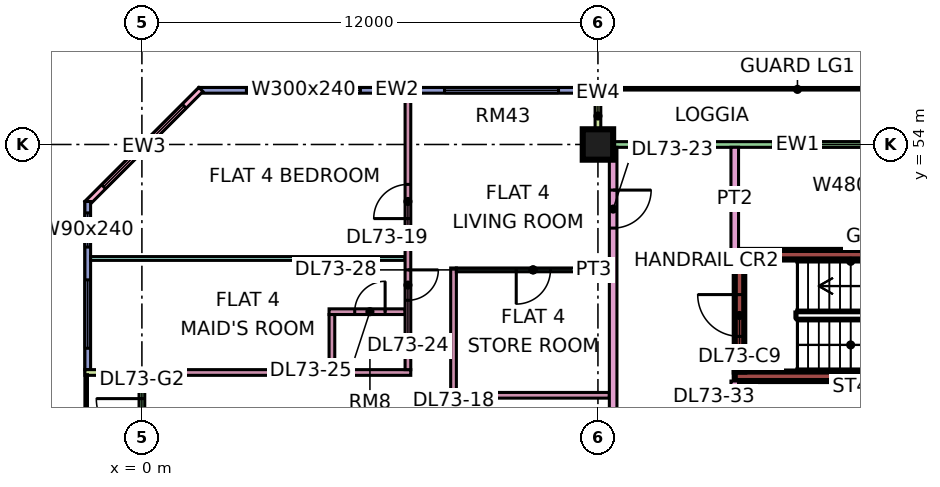
"""IFC4 building model, lengths in metres.
Left out: names, types, materials, properties, quantities, classifications, styles, units other than length and angle.
Written with IfcOpenShell. Run it as: python <this file> out.ifc"""

import sys

from ifc_helpers import new_model, si_unit, direction, frame, frame_2d, origin, origin_2d, place, context, subcontext, project, spatial, rectangle, extrude, element, fill, save


model = new_model("IFC4")
c1 = context("Model", 3, precision=1e-05, world=origin(), true_north=direction((0.0, 1.0)))
c2 = subcontext(c1, "Body", "Model", "MODEL_VIEW")
j1 = project(units=[si_unit("LENGTHUNIT", "METRE"), si_unit("PLANEANGLEUNIT", "RADIAN")], contexts=[c1])
p1 = place(None, origin())
s1 = spatial("IfcSite", under=j1, at=p1, CompositionType="ELEMENT")
p2 = place(p1, origin())
s2 = spatial("IfcBuilding", under=s1, at=p2, CompositionType="ELEMENT")
p3 = place(p2, frame((0.0, 0.0, 310.9)))
s3 = spatial("IfcBuildingStorey", under=s2, at=p3, CompositionType="ELEMENT", Elevation=310.9)
p4 = place(p3, frame((12.0, 54.0, 0.0), z_axis=(0.0, 0.0, 1.0), x_axis=(1.0, 0.0, 0.0)))
e1 = element("IfcColumn", 1, at=p4, inside=s3, PredefinedType="COLUMN", context=c2, shape_type="SweptSolid", body=[
    extrude(rectangle(XDim=0.8, YDim=0.8, at=origin_2d()), origin(), (0.0, 0.0, 1.0), 3.75),
])
for number, where, z_axis, x_axis in (
    (2, (15.6, 47.9, 0.0), (0.0, 0.0, 1.0), (1.0, 0.0, 0.0)),
    (3, (15.6, 51.1, 0.0), (0.0, 0.0, 1.0), (1.0, 0.0, 0.0)),
):
    element("IfcWall", number, at=place(p3, frame(where, z_axis=z_axis, x_axis=x_axis)), inside=s3, PredefinedType="SHEAR", context=c2, shape_type="SweptSolid", body=[
        extrude(rectangle(XDim=7.0, YDim=0.25, at=frame_2d((3.5, 0.0))), origin(), (0.0, 0.0, 1.0), 3.75),
    ])
p5 = place(p3, frame((15.725, 48.025, 0.0), z_axis=(0.0, 0.0, 1.0), x_axis=(0.0, 1.0, 0.0)))
e4 = element("IfcWall", 4, at=p5, inside=s3, PredefinedType="SHEAR", context=c2, shape_type="SweptSolid", body=[
    extrude(rectangle(XDim=2.95, YDim=0.25, at=frame_2d((1.475, 0.0))), origin(), (0.0, 0.0, 1.0), 3.75),
])
p6 = place(p5, frame((0.925, 0.0, 0.0)))
e5 = element("IfcOpeningElement", 5, at=p6, cuts=e4, PredefinedType="OPENING", context=c2, shape_type="SweptSolid", body=[
    extrude(rectangle(XDim=1.1, YDim=2.2, at=frame_2d((0.55, 1.1))), frame((0.0, 0.135, 0.0), z_axis=(0.0, -1.0, 0.0), x_axis=(1.0, 0.0, 0.0)), (0.0, 0.0, 1.0), 0.27),
])
p7 = place(p3, frame((22.425, 54.0, 0.0), z_axis=(0.0, 0.0, 1.0), x_axis=(-1.0, 0.0, 0.0)))
e6 = element("IfcWall", 6, at=p7, inside=s3, PredefinedType="SOLIDWALL", context=c2, shape_type="SweptSolid", body=[
    extrude(rectangle(XDim=10.35, YDim=0.15, at=frame_2d((5.175, 0.0))), origin(), (0.0, 0.0, 1.0), 3.35),
])
p8 = place(p7, frame((1.012, 0.0, 0.45)))
e7 = element("IfcOpeningElement", 7, at=p8, cuts=e6, PredefinedType="OPENING", context=c2, shape_type="SweptSolid", body=[
    extrude(rectangle(XDim=4.8, YDim=2.4, at=frame_2d((2.4, 1.2))), frame((0.0, 0.085, 0.0), z_axis=(0.0, -1.0, 0.0), x_axis=(1.0, 0.0, 0.0)), (0.0, 0.0, 1.0), 0.17),
])
p9 = place(p3, frame((12.0, 55.5, 0.0), z_axis=(0.0, 0.0, 1.0), x_axis=(0.0, -1.0, 0.0)))
e8 = element("IfcWall", 8, at=p9, inside=s3, PredefinedType="SOLIDWALL", context=c2, shape_type="SweptSolid", body=[
    extrude(rectangle(XDim=1.5, YDim=0.15, at=frame_2d((0.75, 0.0))), origin(), (0.0, 0.0, 1.0), 3.35),
])
p10 = place(p3, frame((11.925, 55.425, 0.0), z_axis=(0.0, 0.0, 1.0), x_axis=(-1.0, 0.0, 0.0)))
e9 = element("IfcWall", 9, at=p10, inside=s3, PredefinedType="SOLIDWALL", context=c2, shape_type="SweptSolid", body=[
    extrude(rectangle(XDim=10.425, YDim=0.15, at=frame_2d((5.212, 0.0))), origin(), (0.0, 0.0, 1.0), 3.35),
])
p11 = place(p10, frame((0.962, 0.0, 0.45)))
e10 = element("IfcOpeningElement", 10, at=p11, cuts=e9, PredefinedType="OPENING", context=c2, shape_type="SweptSolid", body=[
    extrude(rectangle(XDim=3.0, YDim=2.4, at=frame_2d((1.5, 1.2))), frame((0.0, 0.085, 0.0), z_axis=(0.0, -1.0, 0.0), x_axis=(1.0, 0.0, 0.0)), (0.0, 0.0, 1.0), 0.17),
])
p12 = place(p10, frame((6.175, 0.0, 0.45)))
e11 = element("IfcOpeningElement", 11, at=p12, cuts=e9, PredefinedType="OPENING", context=c2, shape_type="SweptSolid", body=[
    extrude(rectangle(XDim=3.0, YDim=2.4, at=frame_2d((1.5, 1.2))), frame((0.0, 0.085, 0.0), z_axis=(0.0, -1.0, 0.0), x_axis=(1.0, 0.0, 0.0)), (0.0, 0.0, 1.0), 0.17),
])
p13 = place(p3, frame((1.553, 55.447, 0.0), z_axis=(0.0, 0.0, 1.0), x_axis=(-0.707106781187, -0.707106781187, 0.0)))
e12 = element("IfcWall", 12, at=p13, inside=s3, PredefinedType="SOLIDWALL", context=c2, shape_type="SweptSolid", body=[
    extrude(rectangle(XDim=4.243, YDim=0.15, at=frame_2d((2.121, 0.0))), origin(), (0.0, 0.0, 1.0), 3.35),
])
p14 = place(p13, frame((0.621, 0.0, 0.45)))
e13 = element("IfcOpeningElement", 13, at=p14, cuts=e12, PredefinedType="OPENING", context=c2, shape_type="SweptSolid", body=[
    extrude(rectangle(XDim=3.0, YDim=2.4, at=frame_2d((1.5, 1.2))), frame((0.0, 0.085, 0.0), z_axis=(0.0, -1.0, 0.0), x_axis=(1.0, 0.0, 0.0)), (0.0, 0.0, 1.0), 0.17),
])
p15 = place(p3, frame((-1.425, 52.5, 0.0), z_axis=(0.0, 0.0, 1.0), x_axis=(0.0, -1.0, 0.0)))
e14 = element("IfcWall", 14, at=p15, inside=s3, PredefinedType="SOLIDWALL", context=c2, shape_type="SweptSolid", body=[
    extrude(rectangle(XDim=4.425, YDim=0.15, at=frame_2d((2.212, 0.0))), origin(), (0.0, 0.0, 1.0), 3.35),
])
p16 = place(p15, frame((0.3, 0.0, 0.45)))
e15 = element("IfcOpeningElement", 15, at=p16, cuts=e14, PredefinedType="OPENING", context=c2, shape_type="SweptSolid", body=[
    extrude(rectangle(XDim=0.9, YDim=2.4, at=frame_2d((0.45, 1.2))), frame((0.0, 0.085, 0.0), z_axis=(0.0, -1.0, 0.0), x_axis=(1.0, 0.0, 0.0)), (0.0, 0.0, 1.0), 0.17),
])
p17 = place(p15, frame((2.062, 0.0, 0.45)))
e16 = element("IfcOpeningElement", 16, at=p17, cuts=e14, PredefinedType="OPENING", context=c2, shape_type="SweptSolid", body=[
    extrude(rectangle(XDim=1.8, YDim=2.4, at=frame_2d((0.9, 1.2))), frame((0.0, 0.085, 0.0), z_axis=(0.0, -1.0, 0.0), x_axis=(1.0, 0.0, 0.0)), (0.0, 0.0, 1.0), 0.17),
])
p18 = place(p3, frame((0.0, 47.925, 0.0), z_axis=(0.0, 0.0, 1.0), x_axis=(0.0, -1.0, 0.0)))
e17 = element("IfcWall", 17, at=p18, inside=s3, PredefinedType="SOLIDWALL", context=c2, shape_type="SweptSolid", body=[
    extrude(rectangle(XDim=11.85, YDim=0.15, at=frame_2d((5.925, 0.0))), origin(), (0.0, 0.0, 1.0), 3.35),
])
p19 = place(p18, frame((0.613, 0.0, 0.0)))
e18 = element("IfcOpeningElement", 18, at=p19, cuts=e17, PredefinedType="OPENING", context=c2, shape_type="SweptSolid", body=[
    extrude(rectangle(XDim=1.2, YDim=2.4, at=frame_2d((0.6, 1.2))), frame((0.0, 0.085, 0.0), z_axis=(0.0, -1.0, 0.0), x_axis=(1.0, 0.0, 0.0)), (0.0, 0.0, 1.0), 0.17),
])
p20 = place(p18, frame((4.675, 0.0, 0.45)))
e19 = element("IfcOpeningElement", 19, at=p20, cuts=e17, PredefinedType="OPENING", context=c2, shape_type="SweptSolid", body=[
    extrude(rectangle(XDim=3.0, YDim=2.4, at=frame_2d((1.5, 1.2))), frame((0.0, 0.085, 0.0), z_axis=(0.0, -1.0, 0.0), x_axis=(1.0, 0.0, 0.0)), (0.0, 0.0, 1.0), 0.17),
])
p21 = place(p18, frame((9.275, 0.0, 0.45)))
e20 = element("IfcOpeningElement", 20, at=p21, cuts=e17, PredefinedType="OPENING", context=c2, shape_type="SweptSolid", body=[
    extrude(rectangle(XDim=1.8, YDim=2.4, at=frame_2d((0.9, 1.2))), frame((0.0, 0.085, 0.0), z_axis=(0.0, -1.0, 0.0), x_axis=(1.0, 0.0, 0.0)), (0.0, 0.0, 1.0), 0.17),
])
p22 = place(p3, frame((-1.5, 48.0, 0.0), z_axis=(0.0, 0.0, 1.0), x_axis=(1.0, 0.0, 0.0)))
e21 = element("IfcWall", 21, at=p22, inside=s3, PredefinedType="SOLIDWALL", context=c2, shape_type="SweptSolid", body=[
    extrude(rectangle(XDim=1.5, YDim=0.15, at=frame_2d((0.75, 0.0))), origin(), (0.0, 0.0, 1.0), 3.35),
])
p23 = place(p3, frame((-1.351, 51.0, 0.0), z_axis=(0.0, 0.0, 1.0), x_axis=(1.0, 0.0, 0.0)))
e22 = element("IfcWall", 22, at=p23, inside=s3, PredefinedType="PARTITIONING", context=c2, shape_type="SweptSolid", body=[
    extrude(rectangle(XDim=8.276, YDim=0.1, at=frame_2d((4.138, 0.0))), origin(), (0.0, 0.0, 1.0), 3.35),
])
p24 = place(p3, frame((0.0, 48.0, 0.0), z_axis=(0.0, 0.0, 1.0), x_axis=(1.0, 0.0, 0.0)))
e23 = element("IfcWall", 23, at=p24, inside=s3, PredefinedType="PARTITIONING", context=c2, shape_type="SweptSolid", body=[
    extrude(rectangle(XDim=7.075, YDim=0.15, at=frame_2d((3.538, 0.0))), origin(), (0.0, 0.0, 1.0), 3.35),
])
p25 = place(p3, frame((4.925, 49.6, 0.0), z_axis=(0.0, 0.0, 1.0), x_axis=(1.0, 0.0, 0.0)))
e24 = element("IfcWall", 24, at=p25, inside=s3, PredefinedType="PARTITIONING", context=c2, shape_type="SweptSolid", body=[
    extrude(rectangle(XDim=2.0, YDim=0.15, at=frame_2d((1.0, 0.0))), origin(), (0.0, 0.0, 1.0), 3.35),
])
p26 = place(p25, frame((0.675, 0.0, 0.0)))
e25 = element("IfcOpeningElement", 25, at=p26, cuts=e24, PredefinedType="OPENING", context=c2, shape_type="SweptSolid", body=[
    extrude(rectangle(XDim=0.8, YDim=2.1, at=frame_2d((0.4, 1.05))), frame((0.0, 0.085, 0.0), z_axis=(0.0, -1.0, 0.0), x_axis=(1.0, 0.0, 0.0)), (0.0, 0.0, 1.0), 0.17),
])
p27 = place(p3, frame((5.0, 48.075, 0.0), z_axis=(0.0, 0.0, 1.0), x_axis=(0.0, 1.0, 0.0)))
e26 = element("IfcWall", 26, at=p27, inside=s3, PredefinedType="PARTITIONING", context=c2, shape_type="SweptSolid", body=[
    extrude(rectangle(XDim=1.45, YDim=0.15, at=frame_2d((0.725, 0.0))), origin(), (0.0, 0.0, 1.0), 3.35),
])
p28 = place(p3, frame((7.0, 48.075, 0.0), z_axis=(0.0, 0.0, 1.0), x_axis=(0.0, 1.0, 0.0)))
e27 = element("IfcWall", 27, at=p28, inside=s3, PredefinedType="PARTITIONING", context=c2, shape_type="SweptSolid", body=[
    extrude(rectangle(XDim=7.275, YDim=0.15, at=frame_2d((3.638, 0.0))), origin(), (0.0, 0.0, 1.0), 3.35),
])
p29 = place(p28, frame((3.975, 0.0, 0.0)))
e28 = element("IfcOpeningElement", 28, at=p29, cuts=e27, PredefinedType="OPENING", context=c2, shape_type="SweptSolid", body=[
    extrude(rectangle(XDim=0.9, YDim=2.1, at=frame_2d((0.45, 1.05))), frame((0.0, 0.085, 0.0), z_axis=(0.0, -1.0, 0.0), x_axis=(1.0, 0.0, 0.0)), (0.0, 0.0, 1.0), 0.17),
])
p30 = place(p28, frame((1.825, 0.0, 0.0)))
e29 = element("IfcOpeningElement", 29, at=p30, cuts=e27, PredefinedType="OPENING", context=c2, shape_type="SweptSolid", body=[
    extrude(rectangle(XDim=0.8, YDim=2.1, at=frame_2d((0.4, 1.05))), frame((0.0, 0.085, 0.0), z_axis=(0.0, -1.0, 0.0), x_axis=(1.0, 0.0, 0.0)), (0.0, 0.0, 1.0), 0.17),
])
p31 = place(p3, frame((8.2, 36.1, 0.0), z_axis=(0.0, 0.0, 1.0), x_axis=(0.0, 1.0, 0.0)))
e30 = element("IfcWall", 30, at=p31, inside=s3, PredefinedType="PARTITIONING", context=c2, shape_type="SweptSolid", body=[
    extrude(rectangle(XDim=14.65, YDim=0.15, at=frame_2d((7.325, 0.0))), origin(), (0.0, 0.0, 1.0), 3.35),
])
p32 = place(p31, frame((9.65, 0.0, 0.0)))
e31 = element("IfcOpeningElement", 31, at=p32, cuts=e30, PredefinedType="OPENING", context=c2, shape_type="SweptSolid", body=[
    extrude(rectangle(XDim=0.8, YDim=2.1, at=frame_2d((0.4, 1.05))), frame((0.0, 0.085, 0.0), z_axis=(0.0, -1.0, 0.0), x_axis=(1.0, 0.0, 0.0)), (0.0, 0.0, 1.0), 0.17),
])
p33 = place(p31, frame((5.15, 0.0, 0.0)))
e32 = element("IfcOpeningElement", 32, at=p33, cuts=e30, PredefinedType="OPENING", context=c2, shape_type="SweptSolid", body=[
    extrude(rectangle(XDim=0.9, YDim=2.1, at=frame_2d((0.45, 1.05))), frame((0.0, 0.085, 0.0), z_axis=(0.0, -1.0, 0.0), x_axis=(1.0, 0.0, 0.0)), (0.0, 0.0, 1.0), 0.17),
])
p34 = place(p31, frame((0.65, 0.0, 0.0)))
e33 = element("IfcOpeningElement", 33, at=p34, cuts=e30, PredefinedType="OPENING", context=c2, shape_type="SweptSolid", body=[
    extrude(rectangle(XDim=0.9, YDim=2.1, at=frame_2d((0.45, 1.05))), frame((0.0, 0.085, 0.0), z_axis=(0.0, -1.0, 0.0), x_axis=(1.0, 0.0, 0.0)), (0.0, 0.0, 1.0), 0.17),
])
p35 = place(p3, frame((8.275, 47.4, 0.0), z_axis=(0.0, 0.0, 1.0), x_axis=(1.0, 0.0, 0.0)))
e34 = element("IfcWall", 34, at=p35, inside=s3, PredefinedType="PARTITIONING", context=c2, shape_type="SweptSolid", body=[
    extrude(rectangle(XDim=4.025, YDim=0.15, at=frame_2d((2.013, 0.0))), origin(), (0.0, 0.0, 1.0), 3.35),
])
p36 = place(p3, frame((8.275, 50.7, 0.0), z_axis=(0.0, 0.0, 1.0), x_axis=(1.0, 0.0, 0.0)))
e35 = element("IfcWall", 35, at=p36, inside=s3, PredefinedType="PARTITIONING", context=c2, shape_type="SweptSolid", body=[
    extrude(rectangle(XDim=4.025, YDim=0.1, at=frame_2d((2.013, 0.0))), origin(), (0.0, 0.0, 1.0), 3.35),
])
p37 = place(p36, frame((1.575, 0.0, 0.0)))
e36 = element("IfcOpeningElement", 36, at=p37, cuts=e35, PredefinedType="OPENING", context=c2, shape_type="SweptSolid", body=[
    extrude(rectangle(XDim=0.9, YDim=2.1, at=frame_2d((0.45, 1.05))), frame((0.0, 0.06, 0.0), z_axis=(0.0, -1.0, 0.0), x_axis=(1.0, 0.0, 0.0)), (0.0, 0.0, 1.0), 0.12),
])
p38 = place(p3, frame((12.4, 20.0, 0.0), z_axis=(0.0, 0.0, 1.0), x_axis=(0.0, 1.0, 0.0)))
e37 = element("IfcWall", 37, at=p38, inside=s3, PredefinedType="PARTITIONING", context=c2, shape_type="SweptSolid", body=[
    extrude(rectangle(XDim=33.926, YDim=0.2, at=frame_2d((16.963, 0.0))), origin(), (0.0, 0.0, 1.0), 3.35),
])
p39 = place(p38, frame((31.8, 0.0, 0.0)))
e38 = element("IfcOpeningElement", 38, at=p39, cuts=e37, PredefinedType="OPENING", context=c2, shape_type="SweptSolid", body=[
    extrude(rectangle(XDim=1.0, YDim=2.1, at=frame_2d((0.5, 1.05))), frame((0.0, 0.11, 0.0), z_axis=(0.0, -1.0, 0.0), x_axis=(1.0, 0.0, 0.0)), (0.0, 0.0, 1.0), 0.22),
])
p40 = place(p38, frame((0.6, 0.0, 0.0)))
e39 = element("IfcOpeningElement", 39, at=p40, cuts=e37, PredefinedType="OPENING", context=c2, shape_type="SweptSolid", body=[
    extrude(rectangle(XDim=1.2, YDim=2.1, at=frame_2d((0.6, 1.05))), frame((0.0, 0.11, 0.0), z_axis=(0.0, -1.0, 0.0), x_axis=(1.0, 0.0, 0.0)), (0.0, 0.0, 1.0), 0.22),
])
p41 = place(p38, frame((4.5, 0.0, 0.0)))
e40 = element("IfcOpeningElement", 40, at=p41, cuts=e37, PredefinedType="OPENING", context=c2, shape_type="SweptSolid", body=[
    extrude(rectangle(XDim=1.0, YDim=2.1, at=frame_2d((0.5, 1.05))), frame((0.0, 0.11, 0.0), z_axis=(0.0, -1.0, 0.0), x_axis=(1.0, 0.0, 0.0)), (0.0, 0.0, 1.0), 0.22),
])
p42 = place(p3, frame((15.6, 20.0, 0.0), z_axis=(0.0, 0.0, 1.0), x_axis=(0.0, 1.0, 0.0)))
e41 = element("IfcWall", 41, at=p42, inside=s3, PredefinedType="PARTITIONING", context=c2, shape_type="SweptSolid", body=[
    extrude(rectangle(XDim=27.775, YDim=0.2, at=frame_2d((13.887, 0.0))), origin(), (0.0, 0.0, 1.0), 3.35),
])
p43 = place(p42, frame((6.7, 0.0, 0.0)))
e42 = element("IfcOpeningElement", 42, at=p43, cuts=e41, PredefinedType="OPENING", context=c2, shape_type="SweptSolid", body=[
    extrude(rectangle(XDim=1.6, YDim=2.1, at=frame_2d((0.8, 1.05))), frame((0.0, 0.11, 0.0), z_axis=(0.0, -1.0, 0.0), x_axis=(1.0, 0.0, 0.0)), (0.0, 0.0, 1.0), 0.22),
])
p44 = place(p42, frame((12.95, 0.0, 0.0)))
e43 = element("IfcOpeningElement", 43, at=p44, cuts=e41, PredefinedType="OPENING", context=c2, shape_type="SweptSolid", body=[
    extrude(rectangle(XDim=1.0, YDim=2.1, at=frame_2d((0.5, 1.05))), frame((0.0, 0.11, 0.0), z_axis=(0.0, -1.0, 0.0), x_axis=(1.0, 0.0, 0.0)), (0.0, 0.0, 1.0), 0.22),
])
p45 = place(p42, frame((16.75, 0.0, 0.0)))
e44 = element("IfcOpeningElement", 44, at=p45, cuts=e41, PredefinedType="OPENING", context=c2, shape_type="SweptSolid", body=[
    extrude(rectangle(XDim=1.0, YDim=2.1, at=frame_2d((0.5, 1.05))), frame((0.0, 0.11, 0.0), z_axis=(0.0, -1.0, 0.0), x_axis=(1.0, 0.0, 0.0)), (0.0, 0.0, 1.0), 0.22),
])
p46 = place(p42, frame((1.15, 0.0, 0.0)))
e45 = element("IfcOpeningElement", 45, at=p46, cuts=e41, PredefinedType="OPENING", context=c2, shape_type="SweptSolid", body=[
    extrude(rectangle(XDim=1.8, YDim=2.1, at=frame_2d((0.9, 1.05))), frame((0.0, 0.11, 0.0), z_axis=(0.0, -1.0, 0.0), x_axis=(1.0, 0.0, 0.0)), (0.0, 0.0, 1.0), 0.22),
])
p47 = place(p42, frame((25.9, 0.0, 0.0)))
e46 = element("IfcOpeningElement", 46, at=p47, cuts=e41, PredefinedType="OPENING", context=c2, shape_type="SweptSolid", body=[
    extrude(rectangle(XDim=1.0, YDim=2.1, at=frame_2d((0.5, 1.05))), frame((0.0, 0.11, 0.0), z_axis=(0.0, -1.0, 0.0), x_axis=(1.0, 0.0, 0.0)), (0.0, 0.0, 1.0), 0.22),
])
p48 = place(p3, frame((15.6, 51.225, 0.0), z_axis=(0.0, 0.0, 1.0), x_axis=(0.0, 1.0, 0.0)))
e47 = element("IfcWall", 47, at=p48, inside=s3, PredefinedType="PARTITIONING", context=c2, shape_type="SweptSolid", body=[
    extrude(rectangle(XDim=2.701, YDim=0.2, at=frame_2d((1.351, 0.0))), origin(), (0.0, 0.0, 1.0), 3.35),
])
p49 = place(p8, origin())
e48 = element("IfcWindow", 48, at=p49, inside=s3, PartitioningType="SINGLE_PANEL", PredefinedType="WINDOW", context=c2, shape_type="SweptSolid", body=[
    extrude(rectangle(XDim=4.8, YDim=2.4, at=frame_2d((2.4, 1.2))), frame((0.0, 0.03, 0.0), z_axis=(0.0, -1.0, 0.0), x_axis=(1.0, 0.0, 0.0)), (0.0, 0.0, 1.0), 0.06),
])
fill(e7, e48)
p50 = place(p11, origin())
e49 = element("IfcWindow", 49, at=p50, inside=s3, PartitioningType="SINGLE_PANEL", PredefinedType="WINDOW", context=c2, shape_type="SweptSolid", body=[
    extrude(rectangle(XDim=3.0, YDim=2.4, at=frame_2d((1.5, 1.2))), frame((0.0, 0.03, 0.0), z_axis=(0.0, -1.0, 0.0), x_axis=(1.0, 0.0, 0.0)), (0.0, 0.0, 1.0), 0.06),
])
fill(e10, e49)
p51 = place(p12, origin())
e50 = element("IfcWindow", 50, at=p51, inside=s3, PartitioningType="SINGLE_PANEL", PredefinedType="WINDOW", context=c2, shape_type="SweptSolid", body=[
    extrude(rectangle(XDim=3.0, YDim=2.4, at=frame_2d((1.5, 1.2))), frame((0.0, 0.03, 0.0), z_axis=(0.0, -1.0, 0.0), x_axis=(1.0, 0.0, 0.0)), (0.0, 0.0, 1.0), 0.06),
])
fill(e11, e50)
p52 = place(p14, origin())
e51 = element("IfcWindow", 51, at=p52, inside=s3, PartitioningType="SINGLE_PANEL", PredefinedType="WINDOW", context=c2, shape_type="SweptSolid", body=[
    extrude(rectangle(XDim=3.0, YDim=2.4, at=frame_2d((1.5, 1.2))), frame((0.0, 0.03, 0.0), z_axis=(0.0, -1.0, 0.0), x_axis=(1.0, 0.0, 0.0)), (0.0, 0.0, 1.0), 0.06),
])
fill(e13, e51)
p53 = place(p16, origin())
e52 = element("IfcWindow", 52, at=p53, inside=s3, PartitioningType="SINGLE_PANEL", PredefinedType="WINDOW", context=c2, shape_type="SweptSolid", body=[
    extrude(rectangle(XDim=0.9, YDim=2.4, at=frame_2d((0.45, 1.2))), frame((0.0, 0.03, 0.0), z_axis=(0.0, -1.0, 0.0), x_axis=(1.0, 0.0, 0.0)), (0.0, 0.0, 1.0), 0.06),
])
fill(e15, e52)
p54 = place(p17, origin())
e53 = element("IfcWindow", 53, at=p54, inside=s3, PartitioningType="SINGLE_PANEL", PredefinedType="WINDOW", context=c2, shape_type="SweptSolid", body=[
    extrude(rectangle(XDim=1.8, YDim=2.4, at=frame_2d((0.9, 1.2))), frame((0.0, 0.03, 0.0), z_axis=(0.0, -1.0, 0.0), x_axis=(1.0, 0.0, 0.0)), (0.0, 0.0, 1.0), 0.06),
])
fill(e16, e53)
p55 = place(p19, frame((1.2, 0.0, 0.0), z_axis=(0.0, 0.0, 1.0), x_axis=(-1.0, 0.0, 0.0)))
e54 = element("IfcDoor", 54, at=p55, inside=s3, OperationType="DOUBLE_DOOR_SINGLE_SWING", PredefinedType="DOOR", context=c2, shape_type="SweptSolid", body=[
    extrude(rectangle(XDim=1.2, YDim=2.4, at=frame_2d((0.6, 1.2))), frame((0.0, 0.025, 0.0), z_axis=(0.0, -1.0, 0.0), x_axis=(1.0, 0.0, 0.0)), (0.0, 0.0, 1.0), 0.05),
])
fill(e18, e54)
p56 = place(p6, frame((1.1, 0.0, 0.0), z_axis=(0.0, 0.0, 1.0), x_axis=(-1.0, 0.0, 0.0)))
e55 = element("IfcDoor", 55, at=p56, inside=s3, OperationType="SINGLE_SWING_RIGHT", PredefinedType="DOOR", context=c2, shape_type="SweptSolid", body=[
    extrude(rectangle(XDim=1.1, YDim=2.2, at=frame_2d((0.55, 1.1))), frame((0.0, 0.025, 0.0), z_axis=(0.0, -1.0, 0.0), x_axis=(1.0, 0.0, 0.0)), (0.0, 0.0, 1.0), 0.05),
])
fill(e5, e55)
p57 = place(p29, origin())
e56 = element("IfcDoor", 56, at=p57, inside=s3, OperationType="SINGLE_SWING_LEFT", PredefinedType="DOOR", context=c2, shape_type="SweptSolid", body=[
    extrude(rectangle(XDim=0.9, YDim=2.1, at=frame_2d((0.45, 1.05))), frame((0.0, 0.025, 0.0), z_axis=(0.0, -1.0, 0.0), x_axis=(1.0, 0.0, 0.0)), (0.0, 0.0, 1.0), 0.05),
])
fill(e28, e56)
p58 = place(p39, origin())
e57 = element("IfcDoor", 57, at=p58, inside=s3, OperationType="SINGLE_SWING_RIGHT", PredefinedType="DOOR", context=c2, shape_type="SweptSolid", body=[
    extrude(rectangle(XDim=1.0, YDim=2.1, at=frame_2d((0.5, 1.05))), frame((0.0, 0.025, 0.0), z_axis=(0.0, -1.0, 0.0), x_axis=(1.0, 0.0, 0.0)), (0.0, 0.0, 1.0), 0.05),
])
fill(e38, e57)
p59 = place(p30, origin())
e58 = element("IfcDoor", 58, at=p59, inside=s3, OperationType="SINGLE_SWING_RIGHT", PredefinedType="DOOR", context=c2, shape_type="SweptSolid", body=[
    extrude(rectangle(XDim=0.8, YDim=2.1, at=frame_2d((0.4, 1.05))), frame((0.0, 0.025, 0.0), z_axis=(0.0, -1.0, 0.0), x_axis=(1.0, 0.0, 0.0)), (0.0, 0.0, 1.0), 0.05),
])
fill(e29, e58)
p60 = place(p26, frame((0.8, 0.0, 0.0), z_axis=(0.0, 0.0, 1.0), x_axis=(-1.0, 0.0, 0.0)))
e59 = element("IfcDoor", 59, at=p60, inside=s3, OperationType="SINGLE_SWING_RIGHT", PredefinedType="DOOR", context=c2, shape_type="SweptSolid", body=[
    extrude(rectangle(XDim=0.8, YDim=2.1, at=frame_2d((0.4, 1.05))), frame((0.0, 0.025, 0.0), z_axis=(0.0, -1.0, 0.0), x_axis=(1.0, 0.0, 0.0)), (0.0, 0.0, 1.0), 0.05),
])
fill(e25, e59)
p61 = place(p37, frame((0.9, 0.0, 0.0), z_axis=(0.0, 0.0, 1.0), x_axis=(-1.0, 0.0, 0.0)))
e60 = element("IfcDoor", 60, at=p61, inside=s3, OperationType="SINGLE_SWING_LEFT", PredefinedType="DOOR", context=c2, shape_type="SweptSolid", body=[
    extrude(rectangle(XDim=0.9, YDim=2.1, at=frame_2d((0.45, 1.05))), frame((0.0, 0.025, 0.0), z_axis=(0.0, -1.0, 0.0), x_axis=(1.0, 0.0, 0.0)), (0.0, 0.0, 1.0), 0.05),
])
fill(e36, e60)
save(model, sys.argv[1])
